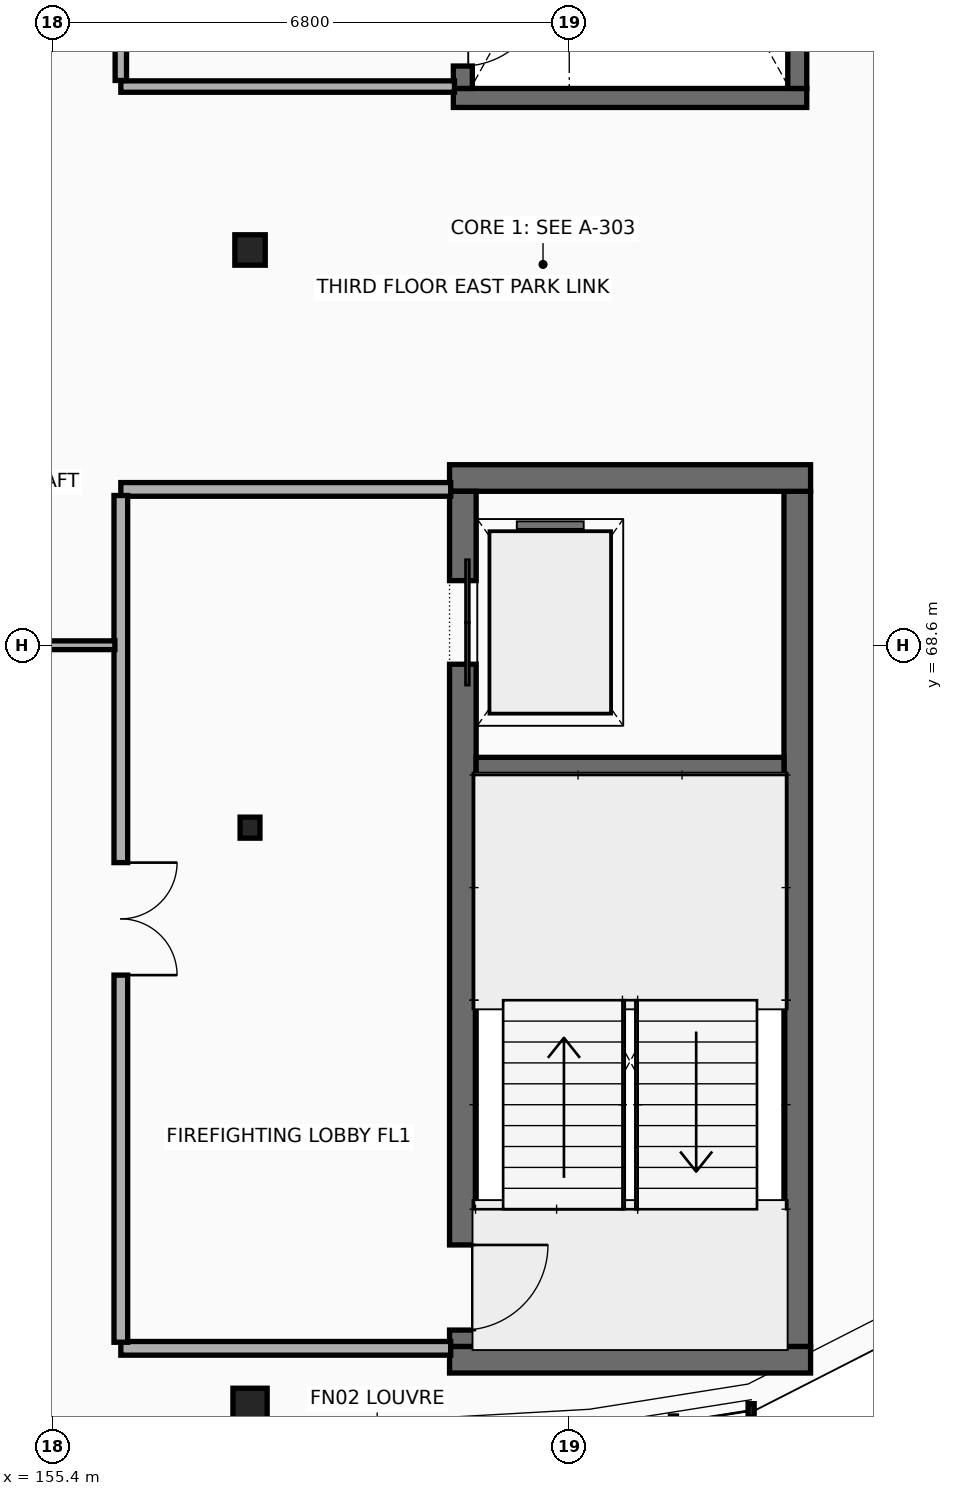
"""IFC4 building model, lengths in metres.
Left out: names, types, materials, properties, quantities, classifications, styles, units other than length and angle.
Written with IfcOpenShell. Run it as: python <this file> out.ifc"""

import sys

from ifc_helpers import new_model, si_unit, direction, frame, frame_2d, origin, origin_2d, place, context, subcontext, project, spatial, rectangle, i_section, extrude, element, fill, save


model = new_model("IFC4")
c1 = context("Model", 3, precision=1e-05, world=origin(), true_north=direction((0.0, 1.0)))
c2 = subcontext(c1, "Body", "Model", "MODEL_VIEW")
j1 = project(units=[si_unit("LENGTHUNIT", "METRE"), si_unit("PLANEANGLEUNIT", "RADIAN")], contexts=[c1])
p1 = place(None, origin())
s1 = spatial("IfcSite", under=j1, at=p1, CompositionType="ELEMENT")
p2 = place(p1, origin())
s2 = spatial("IfcBuilding", under=s1, at=p2, CompositionType="ELEMENT")
p3 = place(p2, frame((0.0, 0.0, 12.6)))
s3 = spatial("IfcBuildingStorey", under=s2, at=p3, CompositionType="ELEMENT", Elevation=12.6)
p4 = place(p3, frame((160.625, 59.2, 0.0), z_axis=(0.0, 0.0, 1.0), x_axis=(1.0, 0.0, 0.0)))
e1 = element("IfcWall", 1, at=p4, inside=s3, PredefinedType="SHEAR", context=c2, shape_type="SweptSolid", body=[
    extrude(rectangle(XDim=4.75, YDim=0.35, at=frame_2d((2.375, 0.0))), origin(), (0.0, 0.0, 1.0), 3.6),
])
p5 = place(p3, frame((165.2, 59.375, 0.0), z_axis=(0.0, 0.0, 1.0), x_axis=(0.0, 1.0, 0.0)))
e2 = element("IfcWall", 2, at=p5, inside=s3, PredefinedType="SHEAR", context=c2, shape_type="SweptSolid", body=[
    extrude(rectangle(XDim=11.25, YDim=0.35, at=frame_2d((5.625, 0.0))), origin(), (0.0, 0.0, 1.0), 3.6),
])
p6 = place(p3, frame((165.375, 70.8, 0.0), z_axis=(0.0, 0.0, 1.0), x_axis=(-1.0, 0.0, 0.0)))
e3 = element("IfcWall", 3, at=p6, inside=s3, PredefinedType="SHEAR", context=c2, shape_type="SweptSolid", body=[
    extrude(rectangle(XDim=4.75, YDim=0.35, at=frame_2d((2.375, 0.0))), origin(), (0.0, 0.0, 1.0), 3.6),
])
p7 = place(p3, frame((160.8, 70.625, 0.0), z_axis=(0.0, 0.0, 1.0), x_axis=(0.0, -1.0, 0.0)))
e4 = element("IfcWall", 4, at=p7, inside=s3, PredefinedType="SHEAR", context=c2, shape_type="SweptSolid", body=[
    extrude(rectangle(XDim=11.25, YDim=0.35, at=frame_2d((5.625, 0.0))), origin(), (0.0, 0.0, 1.0), 3.6),
])
p8 = place(p7, frame((1.175, 0.0, 0.0)))
e5 = element("IfcOpeningElement", 5, at=p8, cuts=e4, PredefinedType="OPENING", context=c2, shape_type="SweptSolid", body=[
    extrude(rectangle(XDim=1.1, YDim=2.2, at=frame_2d((0.55, 1.1))), frame((0.0, 0.185, 0.0), z_axis=(0.0, -1.0, 0.0), x_axis=(1.0, 0.0, 0.0)), (0.0, 0.0, 1.0), 0.37),
])
p9 = place(p7, frame((9.915, 0.0, 0.0)))
e6 = element("IfcOpeningElement", 6, at=p9, cuts=e4, PredefinedType="OPENING", context=c2, shape_type="SweptSolid", body=[
    extrude(rectangle(XDim=1.12, YDim=2.16, at=frame_2d((0.56, 1.08))), frame((0.0, 0.185, 0.0), z_axis=(0.0, -1.0, 0.0), x_axis=(1.0, 0.0, 0.0)), (0.0, 0.0, 1.0), 0.37),
])
p10 = place(p3, frame((160.975, 67.0, 0.0), z_axis=(0.0, 0.0, 1.0), x_axis=(1.0, 0.0, 0.0)))
e7 = element("IfcWall", 7, at=p10, inside=s3, PredefinedType="SHEAR", context=c2, shape_type="SweptSolid", body=[
    extrude(rectangle(XDim=4.05, YDim=0.25, at=frame_2d((2.025, 0.0))), origin(), (0.0, 0.0, 1.0), 3.6),
])
p11 = place(p3, frame((160.675, 75.8, 0.0), z_axis=(0.0, 0.0, 1.0), x_axis=(1.0, 0.0, 0.0)))
e8 = element("IfcWall", 8, at=p11, inside=s3, PredefinedType="SHEAR", context=c2, shape_type="SweptSolid", body=[
    extrude(rectangle(XDim=4.65, YDim=0.25, at=frame_2d((2.325, 0.0))), origin(), (0.0, 0.0, 1.0), 3.6),
])
p12 = place(p3, frame((165.2, 75.925, 0.0), z_axis=(0.0, 0.0, 1.0), x_axis=(0.0, 1.0, 0.0)))
e9 = element("IfcWall", 9, at=p12, inside=s3, PredefinedType="SHEAR", context=c2, shape_type="SweptSolid", body=[
    extrude(rectangle(XDim=11.35, YDim=0.25, at=frame_2d((5.675, 0.0))), origin(), (0.0, 0.0, 1.0), 3.6),
])
p13 = place(p3, frame((160.8, 87.275, 0.0), z_axis=(0.0, 0.0, 1.0), x_axis=(0.0, -1.0, 0.0)))
e10 = element("IfcWall", 10, at=p13, inside=s3, PredefinedType="SHEAR", context=c2, shape_type="SweptSolid", body=[
    extrude(rectangle(XDim=11.35, YDim=0.25, at=frame_2d((5.675, 0.0))), origin(), (0.0, 0.0, 1.0), 3.6),
])
p14 = place(p13, frame((1.275, 0.0, 0.0)))
e11 = element("IfcOpeningElement", 11, at=p14, cuts=e10, PredefinedType="OPENING", context=c2, shape_type="SweptSolid", body=[
    extrude(rectangle(XDim=1.0, YDim=2.15, at=frame_2d((0.5, 1.075))), frame((0.0, 0.135, 0.0), z_axis=(0.0, -1.0, 0.0), x_axis=(1.0, 0.0, 0.0)), (0.0, 0.0, 1.0), 0.27),
])
p15 = place(p13, frame((9.995, 0.0, 0.0)))
e12 = element("IfcOpeningElement", 12, at=p15, cuts=e10, PredefinedType="OPENING", context=c2, shape_type="SweptSolid", body=[
    extrude(rectangle(XDim=1.06, YDim=2.15, at=frame_2d((0.53, 1.075))), frame((0.0, 0.135, 0.0), z_axis=(0.0, -1.0, 0.0), x_axis=(1.0, 0.0, 0.0)), (0.0, 0.0, 1.0), 0.27),
])
p16 = place(p3, frame((158.0, 58.6, 0.0), z_axis=(0.0, 0.0, 1.0), x_axis=(1.0, 0.0, 0.0)))
e13 = element("IfcColumn", 13, at=p16, inside=s3, PredefinedType="COLUMN", context=c2, shape_type="SweptSolid", body=[
    extrude(rectangle(XDim=0.45, YDim=0.45, at=origin_2d()), origin(), (0.0, 0.0, 1.0), 3.6),
])
p17 = place(p3, frame((158.0, 66.2, 0.0), z_axis=(0.0, 0.0, 1.0), x_axis=(1.0, 0.0, 0.0)))
e14 = element("IfcColumn", 14, at=p17, inside=s3, PredefinedType="COLUMN", context=c2, shape_type="SweptSolid", body=[
    extrude(i_section(OverallWidth=0.261, OverallDepth=0.276, WebThickness=0.015, FlangeThickness=0.025, at=origin_2d()), origin(), (0.0, 0.0, 1.0), 3.6),
])
p18 = place(p3, frame((158.0, 73.8, 0.0), z_axis=(0.0, 0.0, 1.0), x_axis=(1.0, 0.0, 0.0)))
e15 = element("IfcColumn", 15, at=p18, inside=s3, PredefinedType="COLUMN", context=c2, shape_type="SweptSolid", body=[
    extrude(rectangle(XDim=0.4, YDim=0.4, at=origin_2d()), origin(), (0.0, 0.0, 1.0), 3.6),
])
p19 = place(p3, frame((156.3, 59.35, 0.0), z_axis=(0.0, 0.0, 1.0), x_axis=(1.0, 0.0, 0.0)))
e16 = element("IfcWall", 16, at=p19, inside=s3, PredefinedType="PARTITIONING", context=c2, shape_type="SweptSolid", body=[
    extrude(rectangle(XDim=4.34, YDim=0.18, at=frame_2d((2.17, 0.0))), origin(), (0.0, 0.0, 1.0), 2.932),
])
p20 = place(p3, frame((160.64, 70.65, 0.0), z_axis=(0.0, 0.0, 1.0), x_axis=(-1.0, 0.0, 0.0)))
e17 = element("IfcWall", 17, at=p20, inside=s3, PredefinedType="PARTITIONING", context=c2, shape_type="SweptSolid", body=[
    extrude(rectangle(XDim=4.34, YDim=0.18, at=frame_2d((2.17, 0.0))), origin(), (0.0, 0.0, 1.0), 2.892),
])
p21 = place(p3, frame((156.3, 70.57, 0.0), z_axis=(0.0, 0.0, 1.0), x_axis=(0.0, -1.0, 0.0)))
e18 = element("IfcWall", 18, at=p21, inside=s3, PredefinedType="PARTITIONING", context=c2, shape_type="SweptSolid", body=[
    extrude(rectangle(XDim=11.14, YDim=0.18, at=frame_2d((5.57, 0.0))), origin(), (0.0, 0.0, 1.0), 2.658),
])
p22 = place(p21, frame((4.83, 0.0, 0.0)))
e19 = element("IfcOpeningElement", 19, at=p22, cuts=e18, PredefinedType="OPENING", context=c2, shape_type="SweptSolid", body=[
    extrude(rectangle(XDim=1.48, YDim=2.22, at=frame_2d((0.74, 1.11))), frame((0.0, 0.1, 0.0), z_axis=(0.0, -1.0, 0.0), x_axis=(1.0, 0.0, 0.0)), (0.0, 0.0, 1.0), 0.2),
])
p23 = place(p3, frame((156.3, 75.95, 0.0), z_axis=(0.0, 0.0, 1.0), x_axis=(1.0, 0.0, 0.0)))
e20 = element("IfcWall", 20, at=p23, inside=s3, PredefinedType="PARTITIONING", context=c2, shape_type="SweptSolid", body=[
    extrude(rectangle(XDim=4.39, YDim=0.15, at=frame_2d((2.195, 0.0))), origin(), (0.0, 0.0, 1.0), 2.888),
])
p24 = place(p3, frame((156.3, 87.17, 0.0), z_axis=(0.0, 0.0, 1.0), x_axis=(0.0, -1.0, 0.0)))
e21 = element("IfcWall", 21, at=p24, inside=s3, PredefinedType="PARTITIONING", context=c2, shape_type="SweptSolid", body=[
    extrude(rectangle(XDim=11.14, YDim=0.15, at=frame_2d((5.57, 0.0))), origin(), (0.0, 0.0, 1.0), 2.888),
])
p25 = place(p24, frame((4.88, 0.0, 0.0)))
e22 = element("IfcOpeningElement", 22, at=p25, cuts=e21, PredefinedType="OPENING", context=c2, shape_type="SweptSolid", body=[
    extrude(rectangle(XDim=1.38, YDim=2.2, at=frame_2d((0.69, 1.1))), frame((0.0, 0.085, 0.0), z_axis=(0.0, -1.0, 0.0), x_axis=(1.0, 0.0, 0.0)), (0.0, 0.0, 1.0), 0.17),
])
p26 = place(p3, frame((143.157, 68.6, 0.0), z_axis=(0.0, 0.0, 1.0), x_axis=(1.0, 0.0, 0.0)))
e23 = element("IfcWall", 23, at=p26, inside=s3, PredefinedType="PARTITIONING", context=c2, shape_type="SweptSolid", body=[
    extrude(rectangle(XDim=13.065, YDim=0.115, at=frame_2d((6.532, 0.0))), origin(), (0.0, 0.0, 1.0), 2.583),
])
p27 = place(p8, origin())
e24 = element("IfcDoor", 24, at=p27, inside=s3, OperationType="DOUBLE_DOOR_SLIDING", PredefinedType="DOOR", context=c2, shape_type="SweptSolid", body=[
    extrude(rectangle(XDim=1.1, YDim=2.2, at=frame_2d((0.55, 1.1))), frame((0.0, 0.025, 0.0), z_axis=(0.0, -1.0, 0.0), x_axis=(1.0, 0.0, 0.0)), (0.0, 0.0, 1.0), 0.05),
])
fill(e5, e24)
p28 = place(p9, origin())
e25 = element("IfcDoor", 25, at=p28, inside=s3, OperationType="SINGLE_SWING_LEFT", PredefinedType="DOOR", context=c2, shape_type="SweptSolid", body=[
    extrude(rectangle(XDim=1.12, YDim=2.16, at=frame_2d((0.56, 1.08))), frame((0.0, 0.025, 0.0), z_axis=(0.0, -1.0, 0.0), x_axis=(1.0, 0.0, 0.0)), (0.0, 0.0, 1.0), 0.05),
])
fill(e6, e25)
p29 = place(p15, origin())
e26 = element("IfcDoor", 26, at=p29, inside=s3, OperationType="SINGLE_SWING_LEFT", PredefinedType="DOOR", context=c2, shape_type="SweptSolid", body=[
    extrude(rectangle(XDim=1.06, YDim=2.15, at=frame_2d((0.53, 1.075))), frame((0.0, 0.025, 0.0), z_axis=(0.0, -1.0, 0.0), x_axis=(1.0, 0.0, 0.0)), (0.0, 0.0, 1.0), 0.05),
])
fill(e12, e26)
p30 = place(p22, origin())
e27 = element("IfcDoor", 27, at=p30, inside=s3, OperationType="DOUBLE_DOOR_SINGLE_SWING", PredefinedType="DOOR", context=c2, shape_type="SweptSolid", body=[
    extrude(rectangle(XDim=1.48, YDim=2.22, at=frame_2d((0.74, 1.11))), frame((0.0, 0.025, 0.0), z_axis=(0.0, -1.0, 0.0), x_axis=(1.0, 0.0, 0.0)), (0.0, 0.0, 1.0), 0.05),
])
fill(e19, e27)
save(model, sys.argv[1])
